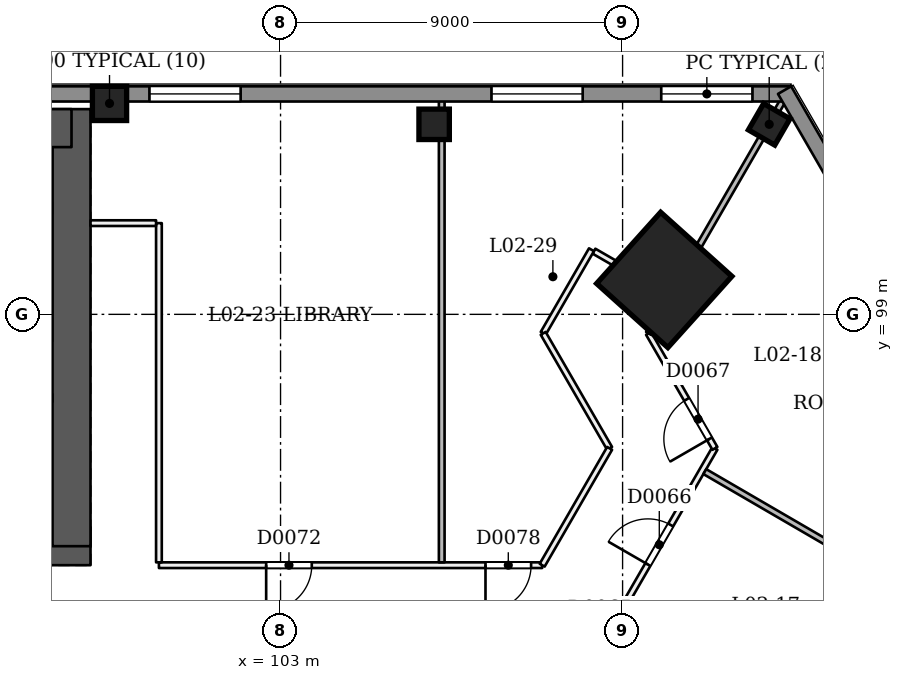
"""IFC4 building model, lengths in metres.
Left out: names, types, materials, properties, quantities, classifications, styles, units other than length and angle.
Written with IfcOpenShell. Run it as: python <this file> out.ifc"""

import sys

from ifc_helpers import new_model, si_unit, direction, frame, frame_2d, origin, origin_2d, place, context, subcontext, project, spatial, rectangle, extrude, element, fill, save


model = new_model("IFC4")
c1 = context("Model", 3, precision=1e-05, world=origin(), true_north=direction((0.0, 1.0)))
c2 = subcontext(c1, "Body", "Model", "MODEL_VIEW")
j1 = project(units=[si_unit("LENGTHUNIT", "METRE"), si_unit("PLANEANGLEUNIT", "RADIAN")], contexts=[c1])
p1 = place(None, origin())
s1 = spatial("IfcSite", under=j1, at=p1, CompositionType="ELEMENT")
p2 = place(p1, origin())
s2 = spatial("IfcBuilding", under=s1, at=p2, CompositionType="ELEMENT")
p3 = place(p2, frame((0.0, 0.0, 13.5)))
s3 = spatial("IfcBuildingStorey", under=s2, at=p3, CompositionType="ELEMENT", Elevation=13.5)
p4 = place(p3, frame((72.5, 92.9, 0.0), z_axis=(0.0, 0.0, 1.0), x_axis=(1.0, 0.0, 0.0)))
e1 = element("IfcWall", 1, at=p4, inside=s3, PredefinedType="SHEAR", context=c2, shape_type="SweptSolid", body=[
    extrude(rectangle(XDim=25.5, YDim=1.0, at=frame_2d((12.75, 0.0))), origin(), (0.0, 0.0, 1.0), 4.5),
])
p5 = place(p4, frame((1.3, 0.0, 0.0)))
e2 = element("IfcOpeningElement", 2, at=p5, cuts=e1, PredefinedType="OPENING", context=c2, shape_type="SweptSolid", body=[
    extrude(rectangle(XDim=1.2, YDim=2.1, at=frame_2d((0.6, 1.05))), frame((0.0, 0.51, 0.0), z_axis=(0.0, -1.0, 0.0), x_axis=(1.0, 0.0, 0.0)), (0.0, 0.0, 1.0), 1.021),
])
p6 = place(p4, frame((3.5, 0.0, 0.0)))
e3 = element("IfcOpeningElement", 3, at=p6, cuts=e1, PredefinedType="OPENING", context=c2, shape_type="SweptSolid", body=[
    extrude(rectangle(XDim=1.2, YDim=2.1, at=frame_2d((0.6, 1.05))), frame((0.0, 0.51, 0.0), z_axis=(0.0, -1.0, 0.0), x_axis=(1.0, 0.0, 0.0)), (0.0, 0.0, 1.0), 1.021),
])
p7 = place(p4, frame((13.5, 0.0, 0.0)))
e4 = element("IfcOpeningElement", 4, at=p7, cuts=e1, PredefinedType="OPENING", context=c2, shape_type="SweptSolid", body=[
    extrude(rectangle(XDim=1.2, YDim=2.1, at=frame_2d((0.6, 1.05))), frame((0.0, 0.51, 0.0), z_axis=(0.0, -1.0, 0.0), x_axis=(1.0, 0.0, 0.0)), (0.0, 0.0, 1.0), 1.021),
])
p8 = place(p4, frame((16.163, 0.0, 0.0)))
e5 = element("IfcOpeningElement", 5, at=p8, cuts=e1, PredefinedType="OPENING", context=c2, shape_type="SweptSolid", body=[
    extrude(rectangle(XDim=1.0, YDim=2.1, at=frame_2d((0.5, 1.05))), frame((0.0, 0.51, 0.0), z_axis=(0.0, -1.0, 0.0), x_axis=(1.0, 0.0, 0.0)), (0.0, 0.0, 1.0), 1.021),
])
p9 = place(p4, frame((18.95, 0.0, 0.0)))
e6 = element("IfcOpeningElement", 6, at=p9, cuts=e1, PredefinedType="OPENING", context=c2, shape_type="SweptSolid", body=[
    extrude(rectangle(XDim=1.0, YDim=2.1, at=frame_2d((0.5, 1.05))), frame((0.0, 0.51, 0.0), z_axis=(0.0, -1.0, 0.0), x_axis=(1.0, 0.0, 0.0)), (0.0, 0.0, 1.0), 1.021),
])
p10 = place(p4, frame((22.137, 0.0, 0.0)))
e7 = element("IfcOpeningElement", 7, at=p10, cuts=e1, PredefinedType="OPENING", context=c2, shape_type="SweptSolid", body=[
    extrude(rectangle(XDim=1.0, YDim=2.1, at=frame_2d((0.5, 1.05))), frame((0.0, 0.51, 0.0), z_axis=(0.0, -1.0, 0.0), x_axis=(1.0, 0.0, 0.0)), (0.0, 0.0, 1.0), 1.021),
])
p11 = place(p3, frame((97.5, 92.9, 0.0), z_axis=(0.0, 0.0, 1.0), x_axis=(0.0, 1.0, 0.0)))
e8 = element("IfcWall", 8, at=p11, inside=s3, PredefinedType="SHEAR", context=c2, shape_type="SweptSolid", body=[
    extrude(rectangle(XDim=11.5, YDim=1.0, at=frame_2d((5.75, 0.0))), origin(), (0.0, 0.0, 1.0), 4.5),
])
p12 = place(p3, frame((97.5, 103.9, 0.0), z_axis=(0.0, 0.0, 1.0), x_axis=(-1.0, 0.0, 0.0)))
e9 = element("IfcWall", 9, at=p12, inside=s3, PredefinedType="SHEAR", context=c2, shape_type="SweptSolid", body=[
    extrude(rectangle(XDim=25.5, YDim=1.0, at=frame_2d((12.75, 0.0))), origin(), (0.0, 0.0, 1.0), 4.5),
])
p13 = place(p3, frame((113.131, 99.895, 0.0), z_axis=(-0.028361930921, 0.009273212596, 0.999554705057), x_axis=(0.498900930689, -0.866374802629, 0.022193754232)))
e10 = element("IfcColumn", 10, at=p13, inside=s3, PredefinedType="COLUMN", context=c2, shape_type="SweptSolid", body=[
    extrude(rectangle(XDim=2.52, YDim=2.52, at=origin_2d()), origin(), (0.0, 0.0, 1.0), 4.502),
])
p14 = place(p3, frame((98.5, 104.55, 0.0), z_axis=(0.0, 0.0, 1.0), x_axis=(1.0, 0.0, 0.0)))
e11 = element("IfcColumn", 11, at=p14, inside=s3, PredefinedType="COLUMN", context=c2, shape_type="SweptSolid", body=[
    extrude(rectangle(XDim=0.9, YDim=0.9, at=origin_2d()), origin(), (0.0, 0.0, 1.0), 4.5),
])
for number, where, z_axis, x_axis in (
    (12, (115.858, 104.0, 0.0), (0.0, 0.0, 1.0), (0.5, 0.866, 0.0)),
    (13, (107.041, 104.0, 0.0), (0.0, 0.0, 1.0), (1.0, 0.0, 0.0)),
):
    element("IfcColumn", number, at=place(p3, frame(where, z_axis=z_axis, x_axis=x_axis)), inside=s3, PredefinedType="COLUMN", context=c2, shape_type="SweptSolid", body=[
        extrude(rectangle(XDim=0.8, YDim=0.8, at=origin_2d()), origin(), (0.0, 0.0, 1.0), 4.5),
    ])
p15 = place(p3, frame((86.747, 47.526, 0.0), z_axis=(0.0, 0.0, 1.0), x_axis=(0.500000085768, 0.866025354266, 0.0)))
e14 = element("IfcWall", 14, at=p15, inside=s3, PredefinedType="PARTITIONING", context=c2, shape_type="SweptSolid", body=[
    extrude(rectangle(XDim=55.365, YDim=0.15, at=frame_2d((27.682, 0.0))), origin(), (0.0, 0.0, 1.0), 4.05),
])
p16 = place(p15, frame((0.97, 0.0, 0.0)))
e15 = element("IfcOpeningElement", 15, at=p16, cuts=e14, PredefinedType="OPENING", context=c2, shape_type="SweptSolid", body=[
    extrude(rectangle(XDim=1.2, YDim=2.1, at=frame_2d((0.6, 1.05))), frame((0.0, 0.085, 0.0), z_axis=(0.0, -1.0, 0.0), x_axis=(1.0, 0.0, 0.0)), (0.0, 0.0, 1.0), 0.171),
])
p17 = place(p15, frame((11.332, 0.0, 0.0)))
e16 = element("IfcOpeningElement", 16, at=p17, cuts=e14, PredefinedType="OPENING", context=c2, shape_type="SweptSolid", body=[
    extrude(rectangle(XDim=1.2, YDim=2.1, at=frame_2d((0.6, 1.05))), frame((0.0, 0.085, 0.0), z_axis=(0.0, -1.0, 0.0), x_axis=(1.0, 0.0, 0.0)), (0.0, 0.0, 1.0), 0.171),
])
p18 = place(p15, frame((29.332, 0.0, 0.0)))
e17 = element("IfcOpeningElement", 17, at=p18, cuts=e14, PredefinedType="OPENING", context=c2, shape_type="SweptSolid", body=[
    extrude(rectangle(XDim=1.2, YDim=2.1, at=frame_2d((0.6, 1.05))), frame((0.0, 0.085, 0.0), z_axis=(0.0, -1.0, 0.0), x_axis=(1.0, 0.0, 0.0)), (0.0, 0.0, 1.0), 0.171),
])
p19 = place(p15, frame((42.132, 0.0, 0.0)))
e18 = element("IfcOpeningElement", 18, at=p19, cuts=e14, PredefinedType="OPENING", context=c2, shape_type="SweptSolid", body=[
    extrude(rectangle(XDim=1.2, YDim=2.1, at=frame_2d((0.6, 1.05))), frame((0.0, 0.085, 0.0), z_axis=(0.0, -1.0, 0.0), x_axis=(1.0, 0.0, 0.0)), (0.0, 0.0, 1.0), 0.171),
])
p20 = place(p15, frame((46.569, 0.0, 0.0)))
e19 = element("IfcOpeningElement", 19, at=p20, cuts=e14, PredefinedType="OPENING", context=c2, shape_type="SweptSolid", body=[
    extrude(rectangle(XDim=1.0, YDim=2.1, at=frame_2d((0.5, 1.05))), frame((0.0, 0.085, 0.0), z_axis=(0.0, -1.0, 0.0), x_axis=(1.0, 0.0, 0.0)), (0.0, 0.0, 1.0), 0.171),
])
p21 = place(p15, frame((48.819, 0.0, 0.0)))
e20 = element("IfcOpeningElement", 20, at=p21, cuts=e14, PredefinedType="OPENING", context=c2, shape_type="SweptSolid", body=[
    extrude(rectangle(XDim=1.0, YDim=2.1, at=frame_2d((0.5, 1.05))), frame((0.0, 0.085, 0.0), z_axis=(0.0, -1.0, 0.0), x_axis=(1.0, 0.0, 0.0)), (0.0, 0.0, 1.0), 0.171),
])
p22 = place(p15, frame((51.837, 0.0, 0.0)))
e21 = element("IfcOpeningElement", 21, at=p22, cuts=e14, PredefinedType="OPENING", context=c2, shape_type="SweptSolid", body=[
    extrude(rectangle(XDim=1.2, YDim=2.1, at=frame_2d((0.6, 1.05))), frame((0.0, 0.085, 0.0), z_axis=(0.0, -1.0, 0.0), x_axis=(1.0, 0.0, 0.0)), (0.0, 0.0, 1.0), 0.171),
])
p23 = place(p3, frame((114.43, 95.474, 0.0), z_axis=(0.0, 0.0, 1.0), x_axis=(-0.500008701212, 0.866020380079, 0.0)))
e22 = element("IfcWall", 22, at=p23, inside=s3, PredefinedType="PARTITIONING", context=c2, shape_type="SweptSolid", body=[
    extrude(rectangle(XDim=3.495, YDim=0.15, at=frame_2d((1.747, 0.0))), origin(), (0.0, 0.0, 1.0), 4.05),
])
p24 = place(p23, frame((0.288, 0.0, 0.0)))
e23 = element("IfcOpeningElement", 23, at=p24, cuts=e22, PredefinedType="OPENING", context=c2, shape_type="SweptSolid", body=[
    extrude(rectangle(XDim=1.2, YDim=2.1, at=frame_2d((0.6, 1.05))), frame((0.0, 0.085, 0.0), z_axis=(0.0, -1.0, 0.0), x_axis=(1.0, 0.0, 0.0)), (0.0, 0.0, 1.0), 0.171),
])
p25 = place(p3, frame((112.682, 98.5, 0.0), z_axis=(0.0, 0.0, 1.0), x_axis=(0.500126914667, 0.865952117167, 0.0)))
e24 = element("IfcWall", 24, at=p25, inside=s3, PredefinedType="PARTITIONING", context=c2, shape_type="SweptSolid", body=[
    extrude(rectangle(XDim=1.08, YDim=0.15, at=frame_2d((0.54, 0.0))), origin(), (0.0, 0.0, 1.0), 4.05),
])
p26 = place(p3, frame((109.884, 92.4, 0.0), z_axis=(0.0, 0.0, 1.0), x_axis=(-1.0, 0.0, 0.0)))
e25 = element("IfcWall", 25, at=p26, inside=s3, PredefinedType="PARTITIONING", context=c2, shape_type="SweptSolid", body=[
    extrude(rectangle(XDim=10.084, YDim=0.15, at=frame_2d((5.042, 0.0))), origin(), (0.0, 0.0, 1.0), 4.05),
])
p27 = place(p26, frame((6.062, 0.0, 0.0)))
e26 = element("IfcOpeningElement", 26, at=p27, cuts=e25, PredefinedType="OPENING", context=c2, shape_type="SweptSolid", body=[
    extrude(rectangle(XDim=1.2, YDim=2.1, at=frame_2d((0.6, 1.05))), frame((0.0, 0.085, 0.0), z_axis=(0.0, -1.0, 0.0), x_axis=(1.0, 0.0, 0.0)), (0.0, 0.0, 1.0), 0.171),
])
p28 = place(p26, frame((0.291, 0.0, 0.0)))
e27 = element("IfcOpeningElement", 27, at=p28, cuts=e25, PredefinedType="OPENING", context=c2, shape_type="SweptSolid", body=[
    extrude(rectangle(XDim=1.2, YDim=2.1, at=frame_2d((0.6, 1.05))), frame((0.0, 0.085, 0.0), z_axis=(0.0, -1.0, 0.0), x_axis=(1.0, 0.0, 0.0)), (0.0, 0.0, 1.0), 0.171),
])
p29 = place(p3, frame((99.8, 92.475, 0.0), z_axis=(0.0, 0.0, 1.0), x_axis=(0.0, 1.0, 0.0)))
e28 = element("IfcWall", 28, at=p29, inside=s3, PredefinedType="PARTITIONING", context=c2, shape_type="SweptSolid", body=[
    extrude(rectangle(XDim=8.925, YDim=0.15, at=frame_2d((4.462, 0.0))), origin(), (0.0, 0.0, 1.0), 4.05),
])
p30 = place(p3, frame((99.725, 101.4, 0.0), z_axis=(0.0, 0.0, 1.0), x_axis=(-1.0, 0.0, 0.0)))
e29 = element("IfcWall", 29, at=p30, inside=s3, PredefinedType="PARTITIONING", context=c2, shape_type="SweptSolid", body=[
    extrude(rectangle(XDim=1.725, YDim=0.15, at=frame_2d((0.863, 0.0))), origin(), (0.0, 0.0, 1.0), 4.05),
])
p31 = place(p3, frame((113.195, 99.538, 0.0), z_axis=(0.0, 0.0, 1.0), x_axis=(-0.866017533419, 0.500013631625, 0.0)))
e30 = element("IfcWall", 30, at=p31, inside=s3, PredefinedType="PARTITIONING", context=c2, shape_type="SweptSolid", body=[
    extrude(rectangle(XDim=2.25, YDim=0.15, at=frame_2d((1.125, 0.0))), origin(), (0.0, 0.0, 1.0), 4.05),
])
p32 = place(p3, frame((111.181, 100.7, 0.0), z_axis=(0.0, 0.0, 1.0), x_axis=(-0.500035802948, -0.866004731956, 0.0)))
e31 = element("IfcWall", 31, at=p32, inside=s3, PredefinedType="PARTITIONING", context=c2, shape_type="SweptSolid", body=[
    extrude(rectangle(XDim=2.54, YDim=0.15, at=frame_2d((1.27, 0.0))), origin(), (0.0, 0.0, 1.0), 4.05),
])
p33 = place(p3, frame((109.911, 98.5, 0.0), z_axis=(0.0, 0.0, 1.0), x_axis=(0.500008701212, -0.866020380079, 0.0)))
e32 = element("IfcWall", 32, at=p33, inside=s3, PredefinedType="PARTITIONING", context=c2, shape_type="SweptSolid", body=[
    extrude(rectangle(XDim=3.495, YDim=0.15, at=frame_2d((1.747, 0.0))), origin(), (0.0, 0.0, 1.0), 4.05),
])
p34 = place(p3, frame((111.658, 95.474, 0.0), z_axis=(0.0, 0.0, 1.0), x_axis=(-0.500008260065, -0.866020634781, 0.0)))
e33 = element("IfcWall", 33, at=p34, inside=s3, PredefinedType="PARTITIONING", context=c2, shape_type="SweptSolid", body=[
    extrude(rectangle(XDim=3.549, YDim=0.15, at=frame_2d((1.775, 0.0))), origin(), (0.0, 0.0, 1.0), 4.05),
])
p35 = place(p3, frame((119.631, 91.683, 0.0), z_axis=(0.0, 0.0, 1.0), x_axis=(-0.864489243455, 0.502651318462, 0.0)))
e34 = element("IfcWall", 34, at=p35, inside=s3, PredefinedType="PARTITIONING", context=c2, shape_type="SweptSolid", body=[
    extrude(rectangle(XDim=6.325, YDim=0.15, at=frame_2d((3.163, 0.0))), origin(), (0.0, 0.0, 1.0), 4.05),
])
p36 = place(p3, frame((116.377, 104.9, 0.0), z_axis=(0.0, 0.0, 1.0), x_axis=(-0.500004896655, -0.866022576681, 0.0)))
e35 = element("IfcWall", 35, at=p36, inside=s3, PredefinedType="PARTITIONING", context=c2, shape_type="SweptSolid", body=[
    extrude(rectangle(XDim=6.235, YDim=0.15, at=frame_2d((3.118, 0.0))), origin(), (0.0, 0.0, 1.0), 4.05),
])
p37 = place(p3, frame((107.241, 92.475, 0.0), z_axis=(0.0, 0.0, 1.0), x_axis=(0.0, 1.0, 0.0)))
e36 = element("IfcWall", 36, at=p37, inside=s3, PredefinedType="PARTITIONING", context=c2, shape_type="SweptSolid", body=[
    extrude(rectangle(XDim=12.425, YDim=0.15, at=frame_2d((6.212, 0.0))), origin(), (0.0, 0.0, 1.0), 4.05),
])
p38 = place(p3, frame((53.565, 104.8, 0.0), z_axis=(0.0, 0.0, 1.0), x_axis=(1.0, 0.0, 0.0)))
e37 = element("IfcWall", 37, at=p38, inside=s3, PredefinedType="SOLIDWALL", context=c2, shape_type="SweptSolid", body=[
    extrude(rectangle(XDim=62.871, YDim=0.4, at=frame_2d((31.435, 0.0))), origin(), (0.0, 0.0, 1.0), 4.05),
])
p39 = place(p38, frame((59.452, 0.0, 0.9)))
e38 = element("IfcOpeningElement", 38, at=p39, cuts=e37, PredefinedType="OPENING", context=c2, shape_type="SweptSolid", body=[
    extrude(rectangle(XDim=2.4, YDim=1.5, at=frame_2d((1.2, 0.75))), frame((0.0, 0.21, 0.0), z_axis=(0.0, -1.0, 0.0), x_axis=(1.0, 0.0, 0.0)), (0.0, 0.0, 1.0), 0.421),
])
p40 = place(p38, frame((54.986, 0.0, 0.9)))
e39 = element("IfcOpeningElement", 39, at=p40, cuts=e37, PredefinedType="OPENING", context=c2, shape_type="SweptSolid", body=[
    extrude(rectangle(XDim=2.4, YDim=1.5, at=frame_2d((1.2, 0.75))), frame((0.0, 0.21, 0.0), z_axis=(0.0, -1.0, 0.0), x_axis=(1.0, 0.0, 0.0)), (0.0, 0.0, 1.0), 0.421),
])
p41 = place(p38, frame((45.986, 0.0, 0.9)))
e40 = element("IfcOpeningElement", 40, at=p41, cuts=e37, PredefinedType="OPENING", context=c2, shape_type="SweptSolid", body=[
    extrude(rectangle(XDim=2.4, YDim=1.5, at=frame_2d((1.2, 0.75))), frame((0.0, 0.21, 0.0), z_axis=(0.0, -1.0, 0.0), x_axis=(1.0, 0.0, 0.0)), (0.0, 0.0, 1.0), 0.421),
])
p42 = place(p38, frame((14.486, 0.0, 0.9)))
e41 = element("IfcOpeningElement", 41, at=p42, cuts=e37, PredefinedType="OPENING", context=c2, shape_type="SweptSolid", body=[
    extrude(rectangle(XDim=2.4, YDim=1.5, at=frame_2d((1.2, 0.75))), frame((0.0, 0.21, 0.0), z_axis=(0.0, -1.0, 0.0), x_axis=(1.0, 0.0, 0.0)), (0.0, 0.0, 1.0), 0.421),
])
p43 = place(p38, frame((1.018, 0.0, 0.9)))
e42 = element("IfcOpeningElement", 42, at=p43, cuts=e37, PredefinedType="OPENING", context=c2, shape_type="SweptSolid", body=[
    extrude(rectangle(XDim=2.4, YDim=1.5, at=frame_2d((1.2, 0.75))), frame((0.0, 0.21, 0.0), z_axis=(0.0, -1.0, 0.0), x_axis=(1.0, 0.0, 0.0)), (0.0, 0.0, 1.0), 0.421),
])
p44 = place(p3, frame((121.762, 95.574, 0.0), z_axis=(0.0, 0.0, 1.0), x_axis=(-0.499997306052, -0.866026959131, 0.0)))
e43 = element("IfcWall", 43, at=p44, inside=s3, PredefinedType="SOLIDWALL", context=c2, shape_type="SweptSolid", body=[
    extrude(rectangle(XDim=62.87, YDim=0.4, at=frame_2d((31.435, 0.0))), origin(), (0.0, 0.0, 1.0), 4.05),
])
p45 = place(p44, frame((59.452, 0.0, 0.9)))
e44 = element("IfcOpeningElement", 44, at=p45, cuts=e43, PredefinedType="OPENING", context=c2, shape_type="SweptSolid", body=[
    extrude(rectangle(XDim=2.4, YDim=1.5, at=frame_2d((1.2, 0.75))), frame((0.0, 0.21, 0.0), z_axis=(0.0, -1.0, 0.0), x_axis=(1.0, 0.0, 0.0)), (0.0, 0.0, 1.0), 0.421),
])
p46 = place(p44, frame((54.986, 0.0, 0.9)))
e45 = element("IfcOpeningElement", 45, at=p46, cuts=e43, PredefinedType="OPENING", context=c2, shape_type="SweptSolid", body=[
    extrude(rectangle(XDim=2.4, YDim=1.5, at=frame_2d((1.2, 0.75))), frame((0.0, 0.21, 0.0), z_axis=(0.0, -1.0, 0.0), x_axis=(1.0, 0.0, 0.0)), (0.0, 0.0, 1.0), 0.421),
])
p47 = place(p44, frame((50.486, 0.0, 0.9)))
e46 = element("IfcOpeningElement", 46, at=p47, cuts=e43, PredefinedType="OPENING", context=c2, shape_type="SweptSolid", body=[
    extrude(rectangle(XDim=2.4, YDim=1.5, at=frame_2d((1.2, 0.75))), frame((0.0, 0.21, 0.0), z_axis=(0.0, -1.0, 0.0), x_axis=(1.0, 0.0, 0.0)), (0.0, 0.0, 1.0), 0.421),
])
p48 = place(p44, frame((45.986, 0.0, 0.9)))
e47 = element("IfcOpeningElement", 47, at=p48, cuts=e43, PredefinedType="OPENING", context=c2, shape_type="SweptSolid", body=[
    extrude(rectangle(XDim=2.4, YDim=1.5, at=frame_2d((1.2, 0.75))), frame((0.0, 0.21, 0.0), z_axis=(0.0, -1.0, 0.0), x_axis=(1.0, 0.0, 0.0)), (0.0, 0.0, 1.0), 0.421),
])
p49 = place(p44, frame((41.486, 0.0, 0.9)))
e48 = element("IfcOpeningElement", 48, at=p49, cuts=e43, PredefinedType="OPENING", context=c2, shape_type="SweptSolid", body=[
    extrude(rectangle(XDim=2.4, YDim=1.5, at=frame_2d((1.2, 0.75))), frame((0.0, 0.21, 0.0), z_axis=(0.0, -1.0, 0.0), x_axis=(1.0, 0.0, 0.0)), (0.0, 0.0, 1.0), 0.421),
])
p50 = place(p44, frame((36.986, 0.0, 0.9)))
e49 = element("IfcOpeningElement", 49, at=p50, cuts=e43, PredefinedType="OPENING", context=c2, shape_type="SweptSolid", body=[
    extrude(rectangle(XDim=2.4, YDim=1.5, at=frame_2d((1.2, 0.75))), frame((0.0, 0.21, 0.0), z_axis=(0.0, -1.0, 0.0), x_axis=(1.0, 0.0, 0.0)), (0.0, 0.0, 1.0), 0.421),
])
p51 = place(p44, frame((23.486, 0.0, 0.9)))
e50 = element("IfcOpeningElement", 50, at=p51, cuts=e43, PredefinedType="OPENING", context=c2, shape_type="SweptSolid", body=[
    extrude(rectangle(XDim=2.4, YDim=1.5, at=frame_2d((1.2, 0.75))), frame((0.0, 0.21, 0.0), z_axis=(0.0, -1.0, 0.0), x_axis=(1.0, 0.0, 0.0)), (0.0, 0.0, 1.0), 0.421),
])
p52 = place(p44, frame((18.986, 0.0, 0.9)))
e51 = element("IfcOpeningElement", 51, at=p52, cuts=e43, PredefinedType="OPENING", context=c2, shape_type="SweptSolid", body=[
    extrude(rectangle(XDim=2.4, YDim=1.5, at=frame_2d((1.2, 0.75))), frame((0.0, 0.21, 0.0), z_axis=(0.0, -1.0, 0.0), x_axis=(1.0, 0.0, 0.0)), (0.0, 0.0, 1.0), 0.421),
])
p53 = place(p44, frame((14.486, 0.0, 0.9)))
e52 = element("IfcOpeningElement", 52, at=p53, cuts=e43, PredefinedType="OPENING", context=c2, shape_type="SweptSolid", body=[
    extrude(rectangle(XDim=2.4, YDim=1.5, at=frame_2d((1.2, 0.75))), frame((0.0, 0.21, 0.0), z_axis=(0.0, -1.0, 0.0), x_axis=(1.0, 0.0, 0.0)), (0.0, 0.0, 1.0), 0.421),
])
p54 = place(p44, frame((5.486, 0.0, 0.9)))
e53 = element("IfcOpeningElement", 53, at=p54, cuts=e43, PredefinedType="OPENING", context=c2, shape_type="SweptSolid", body=[
    extrude(rectangle(XDim=2.4, YDim=1.5, at=frame_2d((1.2, 0.75))), frame((0.0, 0.21, 0.0), z_axis=(0.0, -1.0, 0.0), x_axis=(1.0, 0.0, 0.0)), (0.0, 0.0, 1.0), 0.421),
])
p55 = place(p44, frame((1.018, 0.0, 0.9)))
e54 = element("IfcOpeningElement", 54, at=p55, cuts=e43, PredefinedType="OPENING", context=c2, shape_type="SweptSolid", body=[
    extrude(rectangle(XDim=2.4, YDim=1.5, at=frame_2d((1.2, 0.75))), frame((0.0, 0.21, 0.0), z_axis=(0.0, -1.0, 0.0), x_axis=(1.0, 0.0, 0.0)), (0.0, 0.0, 1.0), 0.421),
])
p56 = place(p3, frame((116.262, 104.9, 0.0), z_axis=(0.0, 0.0, 1.0), x_axis=(0.50000615651, -0.866021849293, 0.0)))
e55 = element("IfcWall", 55, at=p56, inside=s3, PredefinedType="SOLIDWALL", context=c2, shape_type="SweptSolid", body=[
    extrude(rectangle(XDim=11.0, YDim=0.4, at=frame_2d((5.5, 0.0))), origin(), (0.0, 0.0, 1.0), 4.05),
])
p57 = place(p56, frame((4.3, 0.0, 0.9)))
e56 = element("IfcOpeningElement", 56, at=p57, cuts=e55, PredefinedType="OPENING", context=c2, shape_type="SweptSolid", body=[
    extrude(rectangle(XDim=2.4, YDim=1.5, at=frame_2d((1.2, 0.75))), frame((0.0, 0.21, 0.0), z_axis=(0.0, -1.0, 0.0), x_axis=(1.0, 0.0, 0.0)), (0.0, 0.0, 1.0), 0.421),
])
p58 = place(p22, origin())
e57 = element("IfcDoor", 57, at=p58, inside=s3, OperationType="SINGLE_SWING_LEFT", PredefinedType="NOTDEFINED", context=c2, shape_type="SweptSolid", body=[
    extrude(rectangle(XDim=1.2, YDim=2.1, at=frame_2d((0.6, 1.05))), frame((0.0, 0.025, 0.0), z_axis=(0.0, -1.0, 0.0), x_axis=(1.0, 0.0, 0.0)), (0.0, 0.0, 1.0), 0.05),
])
fill(e21, e57)
p59 = place(p24, origin())
e58 = element("IfcDoor", 58, at=p59, inside=s3, OperationType="SINGLE_SWING_LEFT", PredefinedType="NOTDEFINED", context=c2, shape_type="SweptSolid", body=[
    extrude(rectangle(XDim=1.2, YDim=2.1, at=frame_2d((0.6, 1.05))), frame((0.0, 0.025, 0.0), z_axis=(0.0, -1.0, 0.0), x_axis=(1.0, 0.0, 0.0)), (0.0, 0.0, 1.0), 0.05),
])
fill(e23, e58)
p60 = place(p27, origin())
e59 = element("IfcDoor", 59, at=p60, inside=s3, OperationType="SINGLE_SWING_RIGHT", PredefinedType="NOTDEFINED", context=c2, shape_type="SweptSolid", body=[
    extrude(rectangle(XDim=1.2, YDim=2.1, at=frame_2d((0.6, 1.05))), frame((0.0, 0.025, 0.0), z_axis=(0.0, -1.0, 0.0), x_axis=(1.0, 0.0, 0.0)), (0.0, 0.0, 1.0), 0.05),
])
fill(e26, e59)
p61 = place(p28, origin())
e60 = element("IfcDoor", 60, at=p61, inside=s3, OperationType="SINGLE_SWING_RIGHT", PredefinedType="NOTDEFINED", context=c2, shape_type="SweptSolid", body=[
    extrude(rectangle(XDim=1.2, YDim=2.1, at=frame_2d((0.6, 1.05))), frame((0.0, 0.025, 0.0), z_axis=(0.0, -1.0, 0.0), x_axis=(1.0, 0.0, 0.0)), (0.0, 0.0, 1.0), 0.05),
])
fill(e27, e60)
p62 = place(p39, origin())
e61 = element("IfcWindow", 61, at=p62, inside=s3, PartitioningType="SINGLE_PANEL", PredefinedType="WINDOW", context=c2, shape_type="SweptSolid", body=[
    extrude(rectangle(XDim=2.4, YDim=1.5, at=frame_2d((1.2, 0.75))), frame((0.0, 0.03, 0.0), z_axis=(0.0, -1.0, 0.0), x_axis=(1.0, 0.0, 0.0)), (0.0, 0.0, 1.0), 0.06),
])
fill(e38, e61)
p63 = place(p40, origin())
e62 = element("IfcWindow", 62, at=p63, inside=s3, PartitioningType="SINGLE_PANEL", PredefinedType="WINDOW", context=c2, shape_type="SweptSolid", body=[
    extrude(rectangle(XDim=2.4, YDim=1.5, at=frame_2d((1.2, 0.75))), frame((0.0, 0.03, 0.0), z_axis=(0.0, -1.0, 0.0), x_axis=(1.0, 0.0, 0.0)), (0.0, 0.0, 1.0), 0.06),
])
fill(e39, e62)
p64 = place(p41, origin())
e63 = element("IfcWindow", 63, at=p64, inside=s3, PartitioningType="SINGLE_PANEL", PredefinedType="WINDOW", context=c2, shape_type="SweptSolid", body=[
    extrude(rectangle(XDim=2.4, YDim=1.5, at=frame_2d((1.2, 0.75))), frame((0.0, 0.03, 0.0), z_axis=(0.0, -1.0, 0.0), x_axis=(1.0, 0.0, 0.0)), (0.0, 0.0, 1.0), 0.06),
])
fill(e40, e63)
save(model, sys.argv[1])
